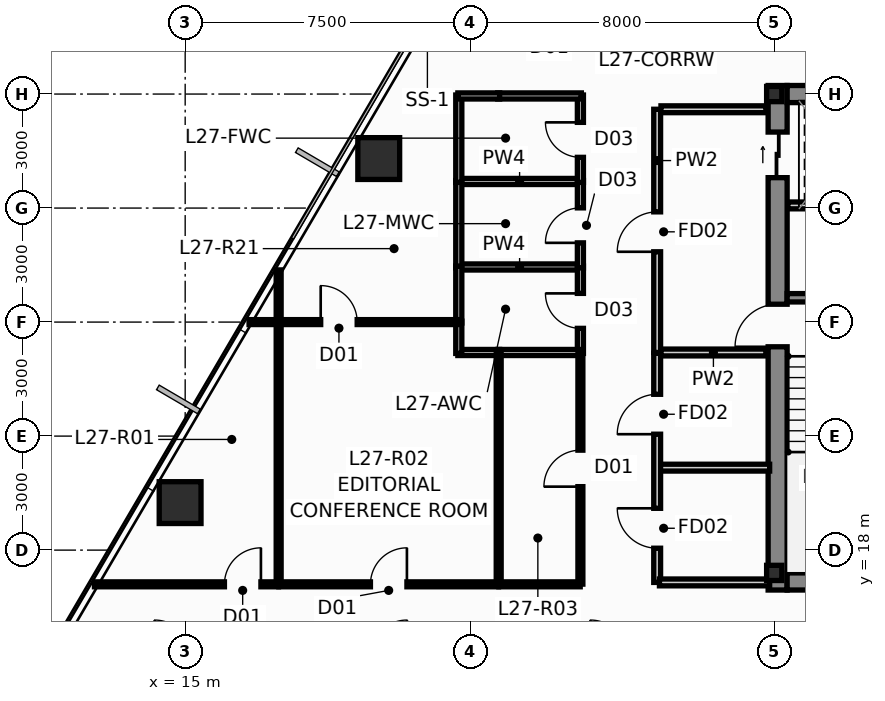
"""IFC4 building model, lengths in metres.
Left out: names, types, materials, properties, quantities, classifications, styles, units other than length and angle.
Written with IfcOpenShell. Run it as: python <this file> out.ifc"""

import sys

from ifc_helpers import new_model, si_unit, direction, frame, frame_2d, origin, origin_2d, place, context, subcontext, project, spatial, rectangle, hollow_rectangle, i_section, extrude, source, transform, mapped, element, fill, save


model = new_model("IFC4")
c1 = context("Model", 3, precision=1e-05, world=origin(), true_north=direction((0.0, 1.0)))
c2 = subcontext(c1, "Body", "Model", "MODEL_VIEW")
j1 = project(units=[si_unit("LENGTHUNIT", "METRE"), si_unit("PLANEANGLEUNIT", "RADIAN")], contexts=[c1])
p1 = place(None, origin())
s1 = spatial("IfcSite", under=j1, at=p1, CompositionType="ELEMENT")
p2 = place(p1, origin())
s2 = spatial("IfcBuilding", under=s1, at=p2, CompositionType="ELEMENT")
p3 = place(p2, frame((0.0, 0.0, 105.4)))
s3 = spatial("IfcBuildingStorey", under=s2, at=p3, CompositionType="ELEMENT", Elevation=105.4)
m1 = source(origin(), c2, "Body", "SweptSolid", [
    extrude(i_section(OverallWidth=0.4, OverallDepth=0.4, WebThickness=0.02, FlangeThickness=0.032, at=origin_2d()), origin(), (0.0, 0.0, 1.0), 3.65),
])
for number, where, z_axis, x_axis in (
    (1, (30.5, 17.4, 0.0), (0.0, 0.0, 1.0), (1.0, 0.0, 0.0)),
    (2, (30.5, 30.0, 0.0), (0.0, 0.0, 1.0), (1.0, 0.0, 0.0)),
):
    element("IfcColumn", number, at=place(p3, frame(where, z_axis=z_axis, x_axis=x_axis)), inside=s3, PredefinedType="COLUMN", context=c2, shape_type="MappedRepresentation", body=[
        mapped(m1, transform((0.0, 0.0, 0.0), scale=1.0)),
    ])
p4 = place(p3, frame((30.59, 16.95, 0.0), z_axis=(0.0, 0.0, 1.0), x_axis=(0.0, 1.0, 0.0)))
e3 = element("IfcWall", 3, at=p4, inside=s3, PredefinedType="SHEAR", context=c2, shape_type="SweptSolid", body=[
    extrude(rectangle(XDim=13.275, YDim=0.5, at=frame_2d((6.638, 0.0))), origin(), (0.0, 0.0, 1.0), 3.65),
])
p5 = place(p4, frame((6.4, 0.0, 0.0)))
e4 = element("IfcOpeningElement", 4, at=p5, cuts=e3, PredefinedType="OPENING", context=c2, shape_type="SweptSolid", body=[
    extrude(rectangle(XDim=1.12, YDim=2.15, at=frame_2d((0.56, 1.075))), frame((0.0, 0.262, 0.0), z_axis=(0.0, -1.0, 0.0), x_axis=(1.0, 0.0, 0.0)), (0.0, 0.0, 1.0), 0.524),
])
p6 = place(p4, frame((10.85, 0.0, 0.0)))
e5 = element("IfcOpeningElement", 5, at=p6, cuts=e3, PredefinedType="OPENING", context=c2, shape_type="SweptSolid", body=[
    extrude(rectangle(XDim=1.2, YDim=2.2, at=frame_2d((0.6, 1.1))), frame((0.0, 0.262, 0.0), z_axis=(0.0, -1.0, 0.0), x_axis=(1.0, 0.0, 0.0)), (0.0, 0.0, 1.0), 0.524),
])
for number, where, z_axis, x_axis in (
    (6, (30.84, 17.175, 0.0), (0.0, 0.0, 1.0), (1.0, 0.0, 0.0)),
    (7, (30.84, 30.0, 0.0), (0.0, 0.0, 1.0), (1.0, 0.0, 0.0)),
):
    element("IfcWall", number, at=place(p3, frame(where, z_axis=z_axis, x_axis=x_axis)), inside=s3, PredefinedType="SHEAR", context=c2, shape_type="SweptSolid", body=[
        extrude(rectangle(XDim=2.9, YDim=0.45, at=frame_2d((1.45, 0.0))), origin(), (0.0, 0.0, 1.0), 3.65),
    ])
p7 = place(p3, frame((30.84, 24.64, 0.0), z_axis=(0.0, 0.0, 1.0), x_axis=(1.0, 0.0, 0.0)))
e8 = element("IfcWall", 8, at=p7, inside=s3, PredefinedType="SHEAR", context=c2, shape_type="SweptSolid", body=[
    extrude(rectangle(XDim=2.9, YDim=0.22, at=frame_2d((1.45, 0.0))), origin(), (0.0, 0.0, 1.0), 3.65),
])
m2 = source(origin(), c2, "Body", "SweptSolid", [
    extrude(hollow_rectangle(XDim=1.1, YDim=1.1, WallThickness=0.06, at=origin_2d()), origin(), (0.0, 0.0, 1.0), 3.651),
])
p8 = place(p3, frame((20.094, 28.303, 0.0), z_axis=(0.014912316331, -0.013775502979, 0.999793907933), x_axis=(0.678553674548, 0.734550822447, 0.0)))
e9 = element("IfcColumn", 9, at=p8, inside=s3, PredefinedType="COLUMN", context=c2, shape_type="MappedRepresentation", body=[
    mapped(m2, transform((0.0, 0.0, 0.0), scale=1.0)),
])
m3 = source(origin(), c2, "Body", "SweptSolid", [
    extrude(hollow_rectangle(XDim=1.1, YDim=1.1, WallThickness=0.06, at=origin_2d()), origin(), (0.0, 0.0, 1.0), 3.651),
])
p9 = place(p3, frame((14.867, 19.25, 0.0), z_axis=(0.010431098089, -0.021530856313, 0.999713766245), x_axis=(0.899947055326, 0.435999194506, 0.0)))
e10 = element("IfcColumn", 10, at=p9, inside=s3, PredefinedType="COLUMN", context=c2, shape_type="MappedRepresentation", body=[
    mapped(m3, transform((0.0, 0.0, 0.0), scale=1.0)),
])
p10 = place(p3, frame((27.42, 23.2, 0.0), z_axis=(0.0, 0.0, 1.0), x_axis=(0.0, 1.0, 0.0)))
e11 = element("IfcWall", 11, at=p10, inside=s3, PredefinedType="PARTITIONING", context=c2, shape_type="SweptSolid", body=[
    extrude(rectangle(XDim=6.4, YDim=0.18, at=frame_2d((3.2, 0.0))), origin(), (0.0, 0.0, 1.0), 3.027),
])
p11 = place(p10, frame((2.65, 0.0, 0.0)))
e12 = element("IfcOpeningElement", 12, at=p11, cuts=e11, PredefinedType="OPENING", context=c2, shape_type="SweptSolid", body=[
    extrude(rectangle(XDim=1.05, YDim=2.15, at=frame_2d((0.525, 1.075))), frame((0.0, 0.102, 0.0), z_axis=(0.0, -1.0, 0.0), x_axis=(1.0, 0.0, 0.0)), (0.0, 0.0, 1.0), 0.204),
])
p12 = place(p3, frame((27.52, 23.2, 0.0), z_axis=(0.0, 0.0, 1.0), x_axis=(1.0, 0.0, 0.0)))
e13 = element("IfcWall", 13, at=p12, inside=s3, PredefinedType="PARTITIONING", context=c2, shape_type="SweptSolid", body=[
    extrude(rectangle(XDim=2.76, YDim=0.18, at=frame_2d((1.38, 0.0))), origin(), (0.0, 0.0, 1.0), 3.4),
])
p13 = place(p3, frame((27.52, 29.6, 0.0), z_axis=(0.0, 0.0, 1.0), x_axis=(1.0, 0.0, 0.0)))
e14 = element("IfcWall", 14, at=p13, inside=s3, PredefinedType="PARTITIONING", context=c2, shape_type="SweptSolid", body=[
    extrude(rectangle(XDim=2.76, YDim=0.18, at=frame_2d((1.38, 0.0))), origin(), (0.0, 0.0, 1.0), 2.783),
])
for number, where, z_axis, x_axis in (
    (15, (30.86, 27.07, 0.0), (0.0, 0.0, 1.0), (1.0, 0.0, 0.0)),
    (16, (27.48, 20.17, 0.0), (0.0, 0.0, 1.0), (1.0, 0.0, 0.0)),
):
    element("IfcWall", number, at=place(p3, frame(where, z_axis=z_axis, x_axis=x_axis)), inside=s3, PredefinedType="PARTITIONING", context=c2, shape_type="SweptSolid", body=[
        extrude(rectangle(XDim=2.9, YDim=0.18, at=frame_2d((1.45, 0.0))), origin(), (0.0, 0.0, 1.0), 3.4),
    ])
p14 = place(p3, frame((27.42, 17.15, 0.0), z_axis=(0.0, 0.0, 1.0), x_axis=(0.0, 1.0, 0.0)))
e17 = element("IfcWall", 17, at=p14, inside=s3, PredefinedType="PARTITIONING", context=c2, shape_type="SweptSolid", body=[
    extrude(rectangle(XDim=6.03, YDim=0.18, at=frame_2d((3.015, 0.0))), origin(), (0.0, 0.0, 1.0), 3.4),
])
p15 = place(p14, frame((0.9, 0.0, 0.0)))
e18 = element("IfcOpeningElement", 18, at=p15, cuts=e17, PredefinedType="OPENING", context=c2, shape_type="SweptSolid", body=[
    extrude(rectangle(XDim=1.05, YDim=2.15, at=frame_2d((0.525, 1.075))), frame((0.0, 0.102, 0.0), z_axis=(0.0, -1.0, 0.0), x_axis=(1.0, 0.0, 0.0)), (0.0, 0.0, 1.0), 0.204),
])
p16 = place(p14, frame((3.9, 0.0, 0.0)))
e19 = element("IfcOpeningElement", 19, at=p16, cuts=e17, PredefinedType="OPENING", context=c2, shape_type="SweptSolid", body=[
    extrude(rectangle(XDim=1.05, YDim=2.15, at=frame_2d((0.525, 1.075))), frame((0.0, 0.102, 0.0), z_axis=(0.0, -1.0, 0.0), x_axis=(1.0, 0.0, 0.0)), (0.0, 0.0, 1.0), 0.204),
])
p17 = place(p3, frame((27.48, 17.15, 0.0), z_axis=(0.0, 0.0, 1.0), x_axis=(1.0, 0.0, 0.0)))
e20 = element("IfcWall", 20, at=p17, inside=s3, PredefinedType="PARTITIONING", context=c2, shape_type="SweptSolid", body=[
    extrude(rectangle(XDim=2.9, YDim=0.18, at=frame_2d((1.45, 0.0))), origin(), (0.0, 0.0, 1.0), 2.783),
])
for number, where, z_axis, x_axis in (
    (21, (22.175, 25.45, 0.0), (0.0, 0.0, 1.0), (1.0, 0.0, 0.0)),
    (22, (22.175, 27.7, 0.0), (0.0, 0.0, 1.0), (1.0, 0.0, 0.0)),
):
    element("IfcWall", number, at=place(p3, frame(where, z_axis=z_axis, x_axis=x_axis)), inside=s3, PredefinedType="PLUMBINGWALL", context=c2, shape_type="SweptSolid", body=[
        extrude(rectangle(XDim=3.25, YDim=0.16, at=frame_2d((1.625, 0.0))), origin(), (0.0, 0.0, 1.0), 3.4),
    ])
p18 = place(p3, frame((25.4, 23.175, 0.0), z_axis=(0.0, 0.0, 1.0), x_axis=(0.0, 1.0, 0.0)))
e23 = element("IfcWall", 23, at=p18, inside=s3, PredefinedType="PLUMBINGWALL", context=c2, shape_type="SweptSolid", body=[
    extrude(rectangle(XDim=2.3, YDim=0.16, at=frame_2d((1.15, 0.0))), origin(), (0.0, 0.0, 1.0), 3.027),
])
p19 = place(p18, frame((0.66, 0.0, 0.0)))
e24 = element("IfcOpeningElement", 24, at=p19, cuts=e23, PredefinedType="OPENING", context=c2, shape_type="SweptSolid", body=[
    extrude(rectangle(XDim=0.92, YDim=2.1, at=frame_2d((0.46, 1.05))), frame((0.0, 0.092, 0.0), z_axis=(0.0, -1.0, 0.0), x_axis=(1.0, 0.0, 0.0)), (0.0, 0.0, 1.0), 0.184),
])
p20 = place(p3, frame((25.4, 25.425, 0.0), z_axis=(0.0, 0.0, 1.0), x_axis=(0.0, 1.0, 0.0)))
e25 = element("IfcWall", 25, at=p20, inside=s3, PredefinedType="PLUMBINGWALL", context=c2, shape_type="SweptSolid", body=[
    extrude(rectangle(XDim=2.3, YDim=0.16, at=frame_2d((1.15, 0.0))), origin(), (0.0, 0.0, 1.0), 3.027),
])
p21 = place(p20, frame((0.66, 0.0, 0.0)))
e26 = element("IfcOpeningElement", 26, at=p21, cuts=e25, PredefinedType="OPENING", context=c2, shape_type="SweptSolid", body=[
    extrude(rectangle(XDim=0.92, YDim=2.1, at=frame_2d((0.46, 1.05))), frame((0.0, 0.092, 0.0), z_axis=(0.0, -1.0, 0.0), x_axis=(1.0, 0.0, 0.0)), (0.0, 0.0, 1.0), 0.184),
])
p22 = place(p3, frame((25.4, 27.675, 0.0), z_axis=(0.0, 0.0, 1.0), x_axis=(0.0, 1.0, 0.0)))
e27 = element("IfcWall", 27, at=p22, inside=s3, PredefinedType="PLUMBINGWALL", context=c2, shape_type="SweptSolid", body=[
    extrude(rectangle(XDim=2.3, YDim=0.16, at=frame_2d((1.15, 0.0))), origin(), (0.0, 0.0, 1.0), 3.027),
])
p23 = place(p22, frame((0.66, 0.0, 0.0)))
e28 = element("IfcOpeningElement", 28, at=p23, cuts=e27, PredefinedType="OPENING", context=c2, shape_type="SweptSolid", body=[
    extrude(rectangle(XDim=0.92, YDim=2.1, at=frame_2d((0.46, 1.05))), frame((0.0, 0.092, 0.0), z_axis=(0.0, -1.0, 0.0), x_axis=(1.0, 0.0, 0.0)), (0.0, 0.0, 1.0), 0.184),
])
for number, where, z_axis, x_axis in (
    (29, (22.2, 25.425, 0.0), (0.0, 0.0, 1.0), (0.0, 1.0, 0.0)),
    (30, (22.2, 27.675, 0.0), (0.0, 0.0, 1.0), (0.0, 1.0, 0.0)),
):
    element("IfcWall", number, at=place(p3, frame(where, z_axis=z_axis, x_axis=x_axis)), inside=s3, PredefinedType="PLUMBINGWALL", context=c2, shape_type="SweptSolid", body=[
        extrude(rectangle(XDim=2.3, YDim=0.16, at=frame_2d((1.15, 0.0))), origin(), (0.0, 0.0, 1.0), 3.027),
    ])
for number, where, z_axis, x_axis in (
    (31, (23.225, 23.2, 0.0), (0.0, 0.0, 1.0), (1.0, 0.0, 0.0)),
    (32, (23.225, 29.95, 0.0), (0.0, 0.0, 1.0), (1.0, 0.0, 0.0)),
):
    element("IfcWall", number, at=place(p3, frame(where, z_axis=z_axis, x_axis=x_axis)), inside=s3, PredefinedType="PLUMBINGWALL", context=c2, shape_type="SweptSolid", body=[
        extrude(rectangle(XDim=2.2, YDim=0.16, at=frame_2d((1.1, 0.0))), origin(), (0.0, 0.0, 1.0), 3.4),
    ])
p24 = place(p3, frame((22.2, 23.975, 0.0), z_axis=(0.0, 0.0, 1.0), x_axis=(0.0, 1.0, 0.0)))
e33 = element("IfcWall", 33, at=p24, inside=s3, PredefinedType="PLUMBINGWALL", context=c2, shape_type="SweptSolid", body=[
    extrude(rectangle(XDim=1.5, YDim=0.16, at=frame_2d((0.75, 0.0))), origin(), (0.0, 0.0, 1.0), 3.027),
])
for number, where, z_axis, x_axis in (
    (34, (22.175, 23.2, 0.0), (0.0, 0.0, 1.0), (1.0, 0.0, 0.0)),
    (35, (22.175, 29.95, 0.0), (0.0, 0.0, 1.0), (1.0, 0.0, 0.0)),
):
    element("IfcWall", number, at=place(p3, frame(where, z_axis=z_axis, x_axis=x_axis)), inside=s3, PredefinedType="PLUMBINGWALL", context=c2, shape_type="SweptSolid", body=[
        extrude(rectangle(XDim=1.1, YDim=0.16, at=frame_2d((0.55, 0.0))), origin(), (0.0, 0.0, 1.0), 3.4),
    ])
p25 = place(p3, frame((22.2, 24.025, 0.0), z_axis=(0.0, 0.0, 1.0), x_axis=(0.0, -1.0, 0.0)))
e36 = element("IfcWall", 36, at=p25, inside=s3, PredefinedType="PLUMBINGWALL", context=c2, shape_type="SweptSolid", body=[
    extrude(rectangle(XDim=0.85, YDim=0.16, at=frame_2d((0.425, 0.0))), origin(), (0.0, 0.0, 1.0), 3.4),
])
p26 = place(p3, frame((17.46, 17.105, 0.0), z_axis=(0.0, 0.0, 1.0), x_axis=(0.0, 1.0, 0.0)))
e37 = element("IfcWall", 37, at=p26, inside=s3, PredefinedType="PARTITIONING", context=c2, shape_type="SweptSolid", body=[
    extrude(rectangle(XDim=6.89, YDim=0.13, at=frame_2d((3.445, 0.0))), origin(), (0.0, 0.0, 1.0), 3.4),
])
p27 = place(p3, frame((25.4, 17.105, 0.0), z_axis=(0.0, 0.0, 1.0), x_axis=(0.0, 1.0, 0.0)))
e38 = element("IfcWall", 38, at=p27, inside=s3, PredefinedType="PARTITIONING", context=c2, shape_type="SweptSolid", body=[
    extrude(rectangle(XDim=6.09, YDim=0.13, at=frame_2d((3.045, 0.0))), origin(), (0.0, 0.0, 1.0), 3.4),
])
p28 = place(p27, frame((2.565, 0.0, 0.0)))
e39 = element("IfcOpeningElement", 39, at=p28, cuts=e38, PredefinedType="OPENING", context=c2, shape_type="SweptSolid", body=[
    extrude(rectangle(XDim=0.96, YDim=2.15, at=frame_2d((0.48, 1.075))), frame((0.0, 0.077, 0.0), z_axis=(0.0, -1.0, 0.0), x_axis=(1.0, 0.0, 0.0)), (0.0, 0.0, 1.0), 0.154),
])
p29 = place(p3, frame((23.25, 17.105, 0.0), z_axis=(0.0, 0.0, 1.0), x_axis=(0.0, 1.0, 0.0)))
e40 = element("IfcWall", 40, at=p29, inside=s3, PredefinedType="PARTITIONING", context=c2, shape_type="SweptSolid", body=[
    extrude(rectangle(XDim=6.09, YDim=0.13, at=frame_2d((3.045, 0.0))), origin(), (0.0, 0.0, 1.0), 3.027),
])
p30 = place(p3, frame((17.465, 17.1, 0.0), z_axis=(0.0, 0.0, 1.0), x_axis=(1.0, 0.0, 0.0)))
e41 = element("IfcWall", 41, at=p30, inside=s3, PredefinedType="PARTITIONING", context=c2, shape_type="SweptSolid", body=[
    extrude(rectangle(XDim=5.78, YDim=0.13, at=frame_2d((2.89, 0.0))), origin(), (0.0, 0.0, 1.0), 3.4),
])
p31 = place(p30, frame((2.41, 0.0, 0.0)))
e42 = element("IfcOpeningElement", 42, at=p31, cuts=e41, PredefinedType="OPENING", context=c2, shape_type="SweptSolid", body=[
    extrude(rectangle(XDim=0.96, YDim=2.15, at=frame_2d((0.48, 1.075))), frame((0.0, 0.077, 0.0), z_axis=(0.0, -1.0, 0.0), x_axis=(1.0, 0.0, 0.0)), (0.0, 0.0, 1.0), 0.154),
])
p32 = place(p3, frame((12.613, 17.1, 0.0), z_axis=(0.0, 0.0, 1.0), x_axis=(1.0, 0.0, 0.0)))
e43 = element("IfcWall", 43, at=p32, inside=s3, PredefinedType="PARTITIONING", context=c2, shape_type="SweptSolid", body=[
    extrude(rectangle(XDim=4.842, YDim=0.13, at=frame_2d((2.421, 0.0))), origin(), (0.0, 0.0, 1.0), 3.4),
])
p33 = place(p32, frame((3.42, 0.0, 0.0)))
e44 = element("IfcOpeningElement", 44, at=p33, cuts=e43, PredefinedType="OPENING", context=c2, shape_type="SweptSolid", body=[
    extrude(rectangle(XDim=0.96, YDim=2.15, at=frame_2d((0.48, 1.075))), frame((0.0, 0.077, 0.0), z_axis=(0.0, -1.0, 0.0), x_axis=(1.0, 0.0, 0.0)), (0.0, 0.0, 1.0), 0.154),
])
p34 = place(p3, frame((16.681, 24.0, 0.0), z_axis=(0.0, 0.0, 1.0), x_axis=(1.0, 0.0, 0.0)))
e45 = element("IfcWall", 45, at=p34, inside=s3, PredefinedType="PARTITIONING", context=c2, shape_type="SweptSolid", body=[
    extrude(rectangle(XDim=5.514, YDim=0.13, at=frame_2d((2.757, 0.0))), origin(), (0.0, 0.0, 1.0), 3.4),
])
p35 = place(p34, frame((1.885, 0.0, 0.0)))
e46 = element("IfcOpeningElement", 46, at=p35, cuts=e45, PredefinedType="OPENING", context=c2, shape_type="SweptSolid", body=[
    extrude(rectangle(XDim=0.96, YDim=2.15, at=frame_2d((0.48, 1.075))), frame((0.0, 0.077, 0.0), z_axis=(0.0, -1.0, 0.0), x_axis=(1.0, 0.0, 0.0)), (0.0, 0.0, 1.0), 0.154),
])
p36 = place(p3, frame((23.255, 17.1, 0.0), z_axis=(0.0, 0.0, 1.0), x_axis=(1.0, 0.0, 0.0)))
e47 = element("IfcWall", 47, at=p36, inside=s3, PredefinedType="PARTITIONING", context=c2, shape_type="SweptSolid", body=[
    extrude(rectangle(XDim=2.14, YDim=0.13, at=frame_2d((1.07, 0.0))), origin(), (0.0, 0.0, 1.0), 3.4),
])
p37 = place(p3, frame((17.46, 24.005, 0.0), z_axis=(0.0, 0.0, 1.0), x_axis=(0.0, 1.0, 0.0)))
e48 = element("IfcWall", 48, at=p37, inside=s3, PredefinedType="PARTITIONING", context=c2, shape_type="SweptSolid", body=[
    extrude(rectangle(XDim=1.368, YDim=0.13, at=frame_2d((0.684, 0.0))), origin(), (0.0, 0.0, 1.0), 3.4),
])
p38 = place(p5, origin())
e49 = element("IfcDoor", 49, at=p38, inside=s3, OperationType="SINGLE_SWING_LEFT", PredefinedType="DOOR", context=c2, shape_type="SweptSolid", body=[
    extrude(rectangle(XDim=1.12, YDim=2.15, at=frame_2d((0.56, 1.075))), frame((0.0, 0.025, 0.0), z_axis=(0.0, -1.0, 0.0), x_axis=(1.0, 0.0, 0.0)), (0.0, 0.0, 1.0), 0.05),
])
fill(e4, e49)
p39 = place(p6, origin())
e50 = element("IfcDoor", 50, at=p39, inside=s3, OperationType="SLIDING_TO_LEFT", PredefinedType="DOOR", context=c2, shape_type="SweptSolid", body=[
    extrude(rectangle(XDim=1.2, YDim=2.2, at=frame_2d((0.6, 1.1))), frame((0.0, 0.025, 0.0), z_axis=(0.0, -1.0, 0.0), x_axis=(1.0, 0.0, 0.0)), (0.0, 0.0, 1.0), 0.05),
])
fill(e5, e50)
p40 = place(p11, origin())
e51 = element("IfcDoor", 51, at=p40, inside=s3, OperationType="SINGLE_SWING_LEFT", PredefinedType="DOOR", context=c2, shape_type="SweptSolid", body=[
    extrude(rectangle(XDim=1.05, YDim=2.15, at=frame_2d((0.525, 1.075))), frame((0.0, 0.025, 0.0), z_axis=(0.0, -1.0, 0.0), x_axis=(1.0, 0.0, 0.0)), (0.0, 0.0, 1.0), 0.05),
])
fill(e12, e51)
p41 = place(p15, origin())
e52 = element("IfcDoor", 52, at=p41, inside=s3, OperationType="SINGLE_SWING_RIGHT", PredefinedType="DOOR", context=c2, shape_type="SweptSolid", body=[
    extrude(rectangle(XDim=1.05, YDim=2.15, at=frame_2d((0.525, 1.075))), frame((0.0, 0.025, 0.0), z_axis=(0.0, -1.0, 0.0), x_axis=(1.0, 0.0, 0.0)), (0.0, 0.0, 1.0), 0.05),
])
fill(e18, e52)
p42 = place(p16, origin())
e53 = element("IfcDoor", 53, at=p42, inside=s3, OperationType="SINGLE_SWING_LEFT", PredefinedType="DOOR", context=c2, shape_type="SweptSolid", body=[
    extrude(rectangle(XDim=1.05, YDim=2.15, at=frame_2d((0.525, 1.075))), frame((0.0, 0.025, 0.0), z_axis=(0.0, -1.0, 0.0), x_axis=(1.0, 0.0, 0.0)), (0.0, 0.0, 1.0), 0.05),
])
fill(e19, e53)
p43 = place(p19, origin())
e54 = element("IfcDoor", 54, at=p43, inside=s3, OperationType="SINGLE_SWING_RIGHT", PredefinedType="DOOR", context=c2, shape_type="SweptSolid", body=[
    extrude(rectangle(XDim=0.92, YDim=2.1, at=frame_2d((0.46, 1.05))), frame((0.0, 0.025, 0.0), z_axis=(0.0, -1.0, 0.0), x_axis=(1.0, 0.0, 0.0)), (0.0, 0.0, 1.0), 0.05),
])
fill(e24, e54)
p44 = place(p21, origin())
e55 = element("IfcDoor", 55, at=p44, inside=s3, OperationType="SINGLE_SWING_LEFT", PredefinedType="DOOR", context=c2, shape_type="SweptSolid", body=[
    extrude(rectangle(XDim=0.92, YDim=2.1, at=frame_2d((0.46, 1.05))), frame((0.0, 0.025, 0.0), z_axis=(0.0, -1.0, 0.0), x_axis=(1.0, 0.0, 0.0)), (0.0, 0.0, 1.0), 0.05),
])
fill(e26, e55)
p45 = place(p23, origin())
e56 = element("IfcDoor", 56, at=p45, inside=s3, OperationType="SINGLE_SWING_RIGHT", PredefinedType="DOOR", context=c2, shape_type="SweptSolid", body=[
    extrude(rectangle(XDim=0.92, YDim=2.1, at=frame_2d((0.46, 1.05))), frame((0.0, 0.025, 0.0), z_axis=(0.0, -1.0, 0.0), x_axis=(1.0, 0.0, 0.0)), (0.0, 0.0, 1.0), 0.05),
])
fill(e28, e56)
p46 = place(p28, origin())
e57 = element("IfcDoor", 57, at=p46, inside=s3, OperationType="SINGLE_SWING_LEFT", PredefinedType="DOOR", context=c2, shape_type="SweptSolid", body=[
    extrude(rectangle(XDim=0.96, YDim=2.15, at=frame_2d((0.48, 1.075))), frame((0.0, 0.025, 0.0), z_axis=(0.0, -1.0, 0.0), x_axis=(1.0, 0.0, 0.0)), (0.0, 0.0, 1.0), 0.05),
])
fill(e39, e57)
p47 = place(p31, origin())
e58 = element("IfcDoor", 58, at=p47, inside=s3, OperationType="SINGLE_SWING_RIGHT", PredefinedType="DOOR", context=c2, shape_type="SweptSolid", body=[
    extrude(rectangle(XDim=0.96, YDim=2.15, at=frame_2d((0.48, 1.075))), frame((0.0, 0.025, 0.0), z_axis=(0.0, -1.0, 0.0), x_axis=(1.0, 0.0, 0.0)), (0.0, 0.0, 1.0), 0.05),
])
fill(e42, e58)
p48 = place(p33, origin())
e59 = element("IfcDoor", 59, at=p48, inside=s3, OperationType="SINGLE_SWING_RIGHT", PredefinedType="DOOR", context=c2, shape_type="SweptSolid", body=[
    extrude(rectangle(XDim=0.96, YDim=2.15, at=frame_2d((0.48, 1.075))), frame((0.0, 0.025, 0.0), z_axis=(0.0, -1.0, 0.0), x_axis=(1.0, 0.0, 0.0)), (0.0, 0.0, 1.0), 0.05),
])
fill(e44, e59)
p49 = place(p35, origin())
e60 = element("IfcDoor", 60, at=p49, inside=s3, OperationType="SINGLE_SWING_LEFT", PredefinedType="DOOR", context=c2, shape_type="SweptSolid", body=[
    extrude(rectangle(XDim=0.96, YDim=2.15, at=frame_2d((0.48, 1.075))), frame((0.0, 0.025, 0.0), z_axis=(0.0, -1.0, 0.0), x_axis=(1.0, 0.0, 0.0)), (0.0, 0.0, 1.0), 0.05),
])
fill(e46, e60)
save(model, sys.argv[1])
